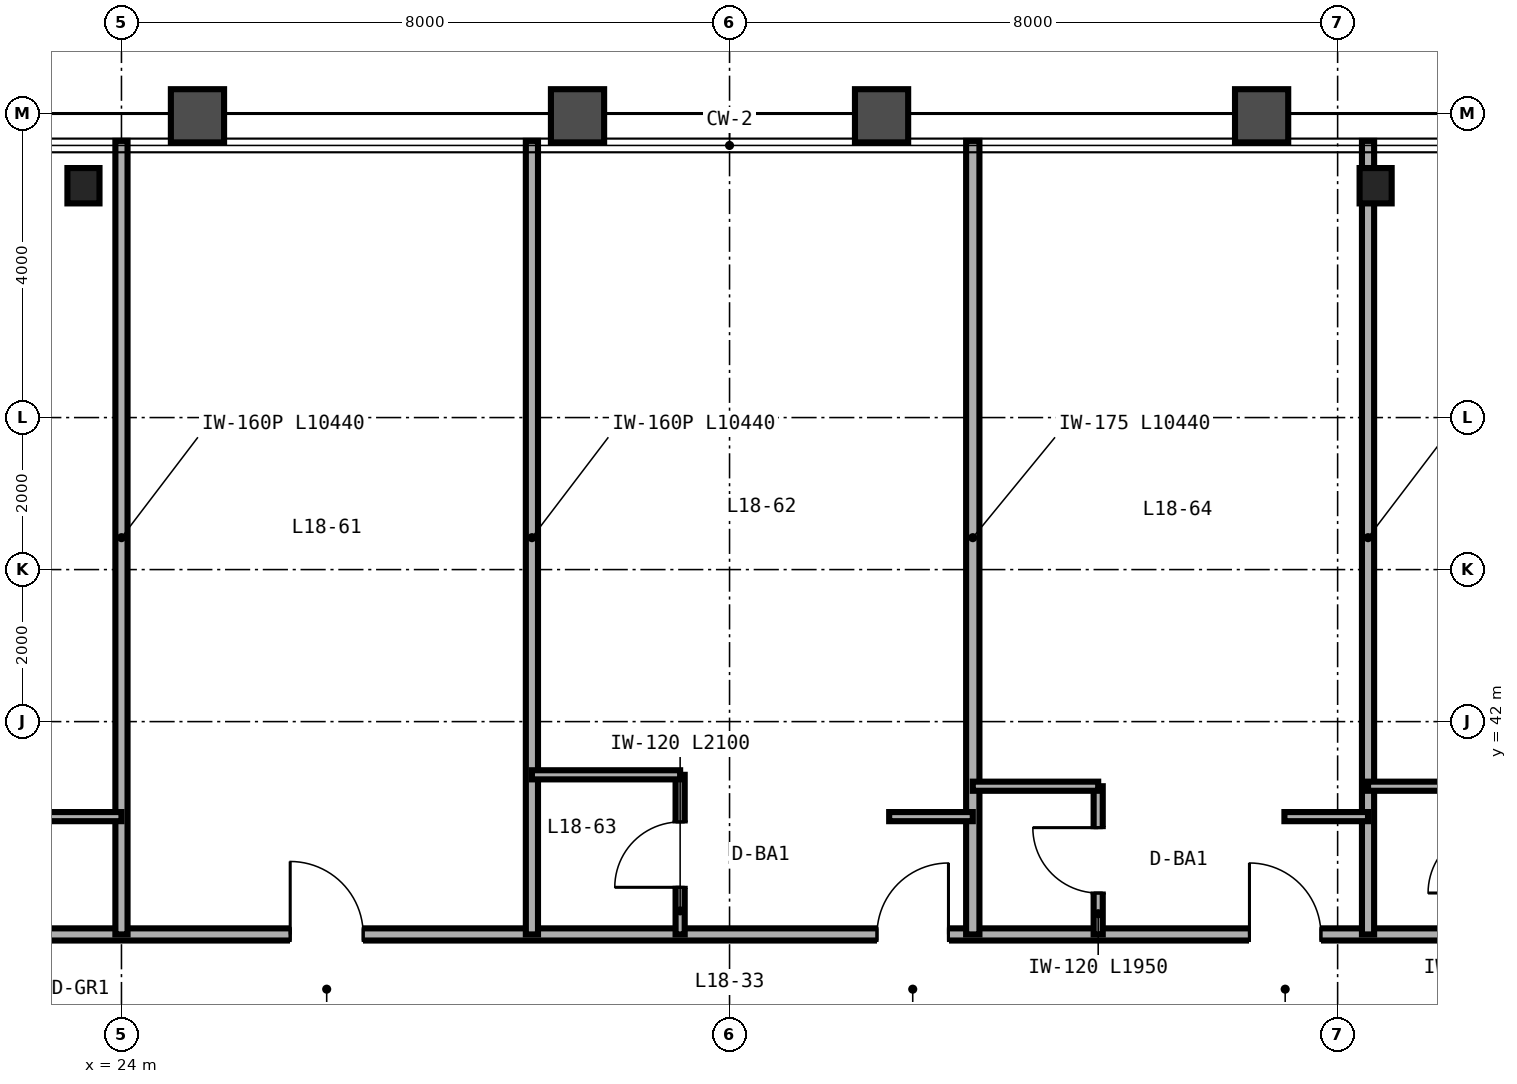
"""IFC4 building model, lengths in metres.
Left out: names, types, materials, properties, quantities, classifications, styles, units other than length and angle.
Written with IfcOpenShell. Run it as: python <this file> out.ifc"""

import sys

from ifc_helpers import new_model, si_unit, direction, frame, frame_2d, origin, origin_2d, place, context, subcontext, project, spatial, rectangle, i_section, extrude, source, transform, mapped, element, fill, save


model = new_model("IFC4")
c1 = context("Model", 3, precision=1e-05, world=origin(), true_north=direction((0.0, 1.0)))
c2 = subcontext(c1, "Body", "Model", "MODEL_VIEW")
j1 = project(units=[si_unit("LENGTHUNIT", "METRE"), si_unit("PLANEANGLEUNIT", "RADIAN")], contexts=[c1])
p1 = place(None, origin())
s1 = spatial("IfcSite", under=j1, at=p1, CompositionType="ELEMENT")
p2 = place(p1, origin())
s2 = spatial("IfcBuilding", under=s1, at=p2, CompositionType="ELEMENT")
p3 = place(p2, frame((0.0, 0.0, 74.4)))
s3 = spatial("IfcBuildingStorey", under=s2, at=p3, CompositionType="ELEMENT", Elevation=74.4)
m1 = source(origin(), c2, "Body", "SweptSolid", [
    extrude(i_section(OverallWidth=0.422, OverallDepth=0.465, WebThickness=0.045, FlangeThickness=0.073, FilletRadius=0.025, at=origin_2d()), origin(), (0.0, 0.0, 1.0), 3.35),
])
for number, where, z_axis, x_axis in (
    (1, (23.5, 49.05, 0.0), (0.0, 0.0, 1.0), (1.0, 0.0, 0.0)),
    (2, (40.5, 49.05, 0.0), (0.0, 0.0, 1.0), (1.0, 0.0, 0.0)),
):
    element("IfcColumn", number, at=place(p3, frame(where, z_axis=z_axis, x_axis=x_axis)), inside=s3, PredefinedType="COLUMN", context=c2, shape_type="MappedRepresentation", body=[
        mapped(m1, transform((0.0, 0.0, 0.0), scale=1.0)),
    ])
p4 = place(p3, frame((14.0, 39.2, 0.0), z_axis=(0.0, 0.0, 1.0), x_axis=(1.0, 0.0, 0.0)))
e3 = element("IfcWall", 3, at=p4, inside=s3, PredefinedType="PARTITIONING", context=c2, shape_type="SweptSolid", body=[
    extrude(rectangle(XDim=36.0, YDim=0.16, at=frame_2d((18.0, 0.0))), origin(), (0.0, 0.0, 1.0), 2.571),
])
p5 = place(p4, frame((3.74, 0.0, 0.0)))
e4 = element("IfcOpeningElement", 4, at=p5, cuts=e3, PredefinedType="OPENING", context=c2, shape_type="SweptSolid", body=[
    extrude(rectangle(XDim=0.94, YDim=2.15, at=frame_2d((0.47, 1.075))), frame((0.0, 0.09, 0.0), z_axis=(0.0, -1.0, 0.0), x_axis=(1.0, 0.0, 0.0)), (0.0, 0.0, 1.0), 0.18),
])
p6 = place(p4, frame((7.79, 0.0, 0.0)))
e5 = element("IfcOpeningElement", 5, at=p6, cuts=e3, PredefinedType="OPENING", context=c2, shape_type="SweptSolid", body=[
    extrude(rectangle(XDim=0.94, YDim=2.15, at=frame_2d((0.47, 1.075))), frame((0.0, 0.09, 0.0), z_axis=(0.0, -1.0, 0.0), x_axis=(1.0, 0.0, 0.0)), (0.0, 0.0, 1.0), 0.18),
])
p7 = place(p4, frame((12.22, 0.0, 0.0)))
e6 = element("IfcOpeningElement", 6, at=p7, cuts=e3, PredefinedType="OPENING", context=c2, shape_type="SweptSolid", body=[
    extrude(rectangle(XDim=0.96, YDim=2.15, at=frame_2d((0.48, 1.075))), frame((0.0, 0.09, 0.0), z_axis=(0.0, -1.0, 0.0), x_axis=(1.0, 0.0, 0.0)), (0.0, 0.0, 1.0), 0.18),
])
p8 = place(p4, frame((19.94, 0.0, 0.0)))
e7 = element("IfcOpeningElement", 7, at=p8, cuts=e3, PredefinedType="OPENING", context=c2, shape_type="SweptSolid", body=[
    extrude(rectangle(XDim=0.94, YDim=2.15, at=frame_2d((0.47, 1.075))), frame((0.0, 0.09, 0.0), z_axis=(0.0, -1.0, 0.0), x_axis=(1.0, 0.0, 0.0)), (0.0, 0.0, 1.0), 0.18),
])
p9 = place(p4, frame((24.84, 0.0, 0.0)))
e8 = element("IfcOpeningElement", 8, at=p9, cuts=e3, PredefinedType="OPENING", context=c2, shape_type="SweptSolid", body=[
    extrude(rectangle(XDim=0.94, YDim=2.15, at=frame_2d((0.47, 1.075))), frame((0.0, 0.09, 0.0), z_axis=(0.0, -1.0, 0.0), x_axis=(1.0, 0.0, 0.0)), (0.0, 0.0, 1.0), 0.18),
])
p10 = place(p4, frame((29.94, 0.0, 0.0)))
e9 = element("IfcOpeningElement", 9, at=p10, cuts=e3, PredefinedType="OPENING", context=c2, shape_type="SweptSolid", body=[
    extrude(rectangle(XDim=0.94, YDim=2.15, at=frame_2d((0.47, 1.075))), frame((0.0, 0.09, 0.0), z_axis=(0.0, -1.0, 0.0), x_axis=(1.0, 0.0, 0.0)), (0.0, 0.0, 1.0), 0.18),
])
p11 = place(p4, frame((33.12, 0.0, 0.0)))
e10 = element("IfcOpeningElement", 10, at=p11, cuts=e3, PredefinedType="OPENING", context=c2, shape_type="SweptSolid", body=[
    extrude(rectangle(XDim=0.96, YDim=2.15, at=frame_2d((0.48, 1.075))), frame((0.0, 0.09, 0.0), z_axis=(0.0, -1.0, 0.0), x_axis=(1.0, 0.0, 0.0)), (0.0, 0.0, 1.0), 0.18),
])
p12 = place(p3, frame((24.0, 39.2, 0.0), z_axis=(0.0, 0.0, 1.0), x_axis=(0.0, 1.0, 0.0)))
e11 = element("IfcWall", 11, at=p12, inside=s3, PredefinedType="PARTITIONING", context=c2, shape_type="SweptSolid", body=[
    extrude(rectangle(XDim=10.44, YDim=0.16, at=frame_2d((5.22, 0.0))), origin(), (0.0, 0.0, 1.0), 2.423),
])
p13 = place(p3, frame((22.9, 40.75, 0.0), z_axis=(0.0, 0.0, 1.0), x_axis=(1.0, 0.0, 0.0)))
e12 = element("IfcWall", 12, at=p13, inside=s3, PredefinedType="PARTITIONING", context=c2, shape_type="SweptSolid", body=[
    extrude(rectangle(XDim=1.1, YDim=0.12, at=frame_2d((0.55, 0.0))), origin(), (0.0, 0.0, 1.0), 2.571),
])
p14 = place(p3, frame((29.4, 39.2, 0.0), z_axis=(0.0, 0.0, 1.0), x_axis=(0.0, 1.0, 0.0)))
e13 = element("IfcWall", 13, at=p14, inside=s3, PredefinedType="PARTITIONING", context=c2, shape_type="SweptSolid", body=[
    extrude(rectangle(XDim=10.44, YDim=0.16, at=frame_2d((5.22, 0.0))), origin(), (0.0, 0.0, 1.0), 2.423),
])
p15 = place(p3, frame((35.2, 39.2, 0.0), z_axis=(0.0, 0.0, 1.0), x_axis=(0.0, 1.0, 0.0)))
e14 = element("IfcWall", 14, at=p15, inside=s3, PredefinedType="PARTITIONING", context=c2, shape_type="SweptSolid", body=[
    extrude(rectangle(XDim=10.44, YDim=0.175, at=frame_2d((5.22, 0.0))), origin(), (0.0, 0.0, 1.0), 2.423),
])
p16 = place(p3, frame((31.35, 39.2, 0.0), z_axis=(0.0, 0.0, 1.0), x_axis=(0.0, 1.0, 0.0)))
e15 = element("IfcWall", 15, at=p16, inside=s3, PredefinedType="PARTITIONING", context=c2, shape_type="SweptSolid", body=[
    extrude(rectangle(XDim=2.1, YDim=0.12, at=frame_2d((1.05, 0.0))), origin(), (0.0, 0.0, 1.0), 3.35),
])
p17 = place(p16, frame((0.62, 0.0, 0.0)))
e16 = element("IfcOpeningElement", 16, at=p17, cuts=e15, PredefinedType="OPENING", context=c2, shape_type="SweptSolid", body=[
    extrude(rectangle(XDim=0.86, YDim=2.1, at=frame_2d((0.43, 1.05))), frame((0.0, 0.07, 0.0), z_axis=(0.0, -1.0, 0.0), x_axis=(1.0, 0.0, 0.0)), (0.0, 0.0, 1.0), 0.14),
])
p18 = place(p3, frame((29.4, 41.3, 0.0), z_axis=(0.0, 0.0, 1.0), x_axis=(1.0, 0.0, 0.0)))
e17 = element("IfcWall", 17, at=p18, inside=s3, PredefinedType="PARTITIONING", context=c2, shape_type="SweptSolid", body=[
    extrude(rectangle(XDim=1.95, YDim=0.12, at=frame_2d((0.975, 0.0))), origin(), (0.0, 0.0, 1.0), 3.35),
])
p19 = place(p3, frame((34.1, 40.75, 0.0), z_axis=(0.0, 0.0, 1.0), x_axis=(1.0, 0.0, 0.0)))
e18 = element("IfcWall", 18, at=p19, inside=s3, PredefinedType="PARTITIONING", context=c2, shape_type="SweptSolid", body=[
    extrude(rectangle(XDim=1.1, YDim=0.12, at=frame_2d((0.55, 0.0))), origin(), (0.0, 0.0, 1.0), 3.35),
])
p20 = place(p3, frame((40.4, 39.2, 0.0), z_axis=(0.0, 0.0, 1.0), x_axis=(0.0, 1.0, 0.0)))
e19 = element("IfcWall", 19, at=p20, inside=s3, PredefinedType="PARTITIONING", context=c2, shape_type="SweptSolid", body=[
    extrude(rectangle(XDim=10.44, YDim=0.16, at=frame_2d((5.22, 0.0))), origin(), (0.0, 0.0, 1.0), 2.423),
])
p21 = place(p3, frame((36.85, 39.2, 0.0), z_axis=(0.0, 0.0, 1.0), x_axis=(0.0, 1.0, 0.0)))
e20 = element("IfcWall", 20, at=p21, inside=s3, PredefinedType="PARTITIONING", context=c2, shape_type="SweptSolid", body=[
    extrude(rectangle(XDim=1.95, YDim=0.12, at=frame_2d((0.975, 0.0))), origin(), (0.0, 0.0, 1.0), 3.35),
])
p22 = place(p21, frame((0.545, 0.0, 0.0)))
e21 = element("IfcOpeningElement", 21, at=p22, cuts=e20, PredefinedType="OPENING", context=c2, shape_type="SweptSolid", body=[
    extrude(rectangle(XDim=0.86, YDim=2.1, at=frame_2d((0.43, 1.05))), frame((0.0, 0.07, 0.0), z_axis=(0.0, -1.0, 0.0), x_axis=(1.0, 0.0, 0.0)), (0.0, 0.0, 1.0), 0.14),
])
p23 = place(p3, frame((35.2, 41.15, 0.0), z_axis=(0.0, 0.0, 1.0), x_axis=(1.0, 0.0, 0.0)))
e22 = element("IfcWall", 22, at=p23, inside=s3, PredefinedType="PARTITIONING", context=c2, shape_type="SweptSolid", body=[
    extrude(rectangle(XDim=1.65, YDim=0.12, at=frame_2d((0.825, 0.0))), origin(), (0.0, 0.0, 1.0), 3.35),
])
p24 = place(p3, frame((39.3, 40.75, 0.0), z_axis=(0.0, 0.0, 1.0), x_axis=(1.0, 0.0, 0.0)))
e23 = element("IfcWall", 23, at=p24, inside=s3, PredefinedType="PARTITIONING", context=c2, shape_type="SweptSolid", body=[
    extrude(rectangle(XDim=1.1, YDim=0.12, at=frame_2d((0.55, 0.0))), origin(), (0.0, 0.0, 1.0), 2.571),
])
p25 = place(p3, frame((40.4, 41.15, 0.0), z_axis=(0.0, 0.0, 1.0), x_axis=(1.0, 0.0, 0.0)))
e24 = element("IfcWall", 24, at=p25, inside=s3, PredefinedType="PARTITIONING", context=c2, shape_type="SweptSolid", body=[
    extrude(rectangle(XDim=1.65, YDim=0.12, at=frame_2d((0.825, 0.0))), origin(), (0.0, 0.0, 1.0), 2.571),
])
m2 = source(origin(), c2, "Body", "SweptSolid", [
    extrude(rectangle(XDim=0.86, YDim=2.1, at=frame_2d((0.43, 1.05))), frame((0.0, 0.025, 0.0), z_axis=(0.0, -1.0, 0.0), x_axis=(1.0, 0.0, 0.0)), (0.0, 0.0, 1.0), 0.05),
])
p26 = place(p17, origin())
e25 = element("IfcDoor", 25, at=p26, inside=s3, OperationType="SINGLE_SWING_LEFT", PredefinedType="DOOR", context=c2, shape_type="MappedRepresentation", body=[
    mapped(m2, transform((0.0, 0.0, 0.0), scale=1.0)),
])
fill(e16, e25)
p27 = place(p22, origin())
e26 = element("IfcDoor", 26, at=p27, inside=s3, OperationType="SINGLE_SWING_RIGHT", PredefinedType="DOOR", context=c2, shape_type="MappedRepresentation", body=[
    mapped(m2, transform((0.0, 0.0, 0.0), scale=1.0)),
])
fill(e21, e26)
m3 = source(origin(), c2, "Body", "SweptSolid", [
    extrude(rectangle(XDim=0.96, YDim=2.15, at=frame_2d((0.48, 1.075))), frame((0.0, 0.025, 0.0), z_axis=(0.0, -1.0, 0.0), x_axis=(1.0, 0.0, 0.0)), (0.0, 0.0, 1.0), 0.05),
])
p28 = place(p7, origin())
e27 = element("IfcDoor", 27, at=p28, inside=s3, OperationType="SINGLE_SWING_LEFT", PredefinedType="DOOR", context=c2, shape_type="MappedRepresentation", body=[
    mapped(m3, transform((0.0, 0.0, 0.0), scale=1.0)),
])
fill(e6, e27)
m4 = source(origin(), c2, "Body", "SweptSolid", [
    extrude(rectangle(XDim=0.94, YDim=2.15, at=frame_2d((0.47, 1.075))), frame((0.0, 0.025, 0.0), z_axis=(0.0, -1.0, 0.0), x_axis=(1.0, 0.0, 0.0)), (0.0, 0.0, 1.0), 0.05),
])
p29 = place(p8, origin())
e28 = element("IfcDoor", 28, at=p29, inside=s3, OperationType="SINGLE_SWING_RIGHT", PredefinedType="DOOR", context=c2, shape_type="MappedRepresentation", body=[
    mapped(m4, transform((0.0, 0.0, 0.0), scale=1.0)),
])
fill(e7, e28)
p30 = place(p9, origin())
e29 = element("IfcDoor", 29, at=p30, inside=s3, OperationType="SINGLE_SWING_LEFT", PredefinedType="DOOR", context=c2, shape_type="MappedRepresentation", body=[
    mapped(m4, transform((0.0, 0.0, 0.0), scale=1.0)),
])
fill(e8, e29)
save(model, sys.argv[1])
